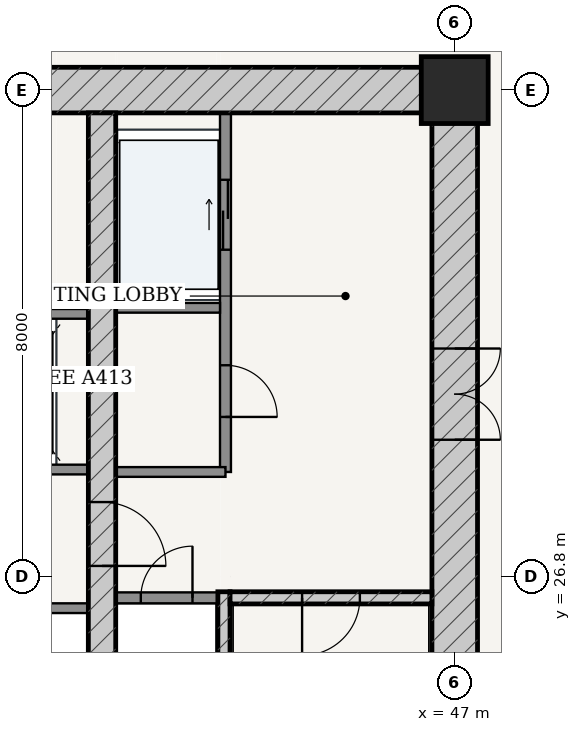
"""IFC4 building model, lengths in metres.
Left out: names, types, materials, properties, quantities, classifications, styles, units other than length and angle.
Written with IfcOpenShell. Run it as: python <this file> out.ifc"""

import sys

from ifc_helpers import new_model, si_unit, direction, frame, frame_2d, origin, origin_2d, place, context, subcontext, project, spatial, rectangle, extrude, source, transform, mapped, element, fill, save


model = new_model("IFC4")
c1 = context("Model", 3, precision=1e-05, world=origin(), true_north=direction((-0.2419218956, 0.970295726276)))
c2 = subcontext(c1, "Body", "Model", "MODEL_VIEW")
j1 = project(units=[si_unit("LENGTHUNIT", "METRE"), si_unit("PLANEANGLEUNIT", "RADIAN")], contexts=[c1])
p1 = place(None, origin())
s1 = spatial("IfcSite", under=j1, at=p1, CompositionType="ELEMENT")
p2 = place(p1, origin())
s2 = spatial("IfcBuilding", under=s1, at=p2, CompositionType="ELEMENT")
p3 = place(p2, frame((0.0, 0.0, 70.8)))
s3 = spatial("IfcBuildingStorey", under=s2, at=p3, CompositionType="ELEMENT", Elevation=70.8)
p4 = place(p3, frame((47.0, 34.8, 0.0), z_axis=(0.0, 0.0, 1.0), x_axis=(1.0, 0.0, 0.0)))
e1 = element("IfcColumn", 1, at=p4, inside=s3, PredefinedType="COLUMN", context=c2, shape_type="SweptSolid", body=[
    extrude(rectangle(XDim=1.1, YDim=1.1, at=origin_2d()), origin(), (0.0, 0.0, 1.0), 3.6),
])
p5 = place(p3, frame((28.625, 34.8, 0.0), z_axis=(0.0, 0.0, 1.0), x_axis=(1.0, 0.0, 0.0)))
e2 = element("IfcWall", 2, at=p5, inside=s3, PredefinedType="SHEAR", context=c2, shape_type="SweptSolid", body=[
    extrude(rectangle(XDim=18.75, YDim=0.75, at=frame_2d((9.375, 0.0))), origin(), (0.0, 0.0, 1.0), 3.15),
])
p6 = place(p5, frame((7.407, 0.0, 0.0)))
e3 = element("IfcOpeningElement", 3, at=p6, cuts=e2, PredefinedType="OPENING", context=c2, shape_type="SweptSolid", body=[
    extrude(rectangle(XDim=0.86, YDim=2.1, at=frame_2d((0.43, 1.05))), frame((0.0, 0.385, 0.0), z_axis=(0.0, -1.0, 0.0), x_axis=(1.0, 0.0, 0.0)), (0.0, 0.0, 1.0), 0.77),
])
p7 = place(p5, frame((10.488, 0.0, 0.0)))
e4 = element("IfcOpeningElement", 4, at=p7, cuts=e2, PredefinedType="OPENING", context=c2, shape_type="SweptSolid", body=[
    extrude(rectangle(XDim=0.85, YDim=2.1, at=frame_2d((0.425, 1.05))), frame((0.0, 0.385, 0.0), z_axis=(0.0, -1.0, 0.0), x_axis=(1.0, 0.0, 0.0)), (0.0, 0.0, 1.0), 0.77),
])
p8 = place(p3, frame((47.0, 19.175, 0.0), z_axis=(0.0, 0.0, 1.0), x_axis=(0.0, 1.0, 0.0)))
e5 = element("IfcWall", 5, at=p8, inside=s3, PredefinedType="SHEAR", context=c2, shape_type="SweptSolid", body=[
    extrude(rectangle(XDim=15.25, YDim=0.75, at=frame_2d((7.625, 0.0))), origin(), (0.0, 0.0, 1.0), 3.15),
])
p9 = place(p8, frame((9.875, 0.0, 0.0)))
e6 = element("IfcOpeningElement", 6, at=p9, cuts=e5, PredefinedType="OPENING", context=c2, shape_type="SweptSolid", body=[
    extrude(rectangle(XDim=1.5, YDim=2.2, at=frame_2d((0.75, 1.1))), frame((0.0, 0.385, 0.0), z_axis=(0.0, -1.0, 0.0), x_axis=(1.0, 0.0, 0.0)), (0.0, 0.0, 1.0), 0.77),
])
p10 = place(p3, frame((43.205, 19.175, 0.0), z_axis=(0.0, 0.0, 1.0), x_axis=(0.0, 1.0, 0.0)))
e7 = element("IfcWall", 7, at=p10, inside=s3, PredefinedType="SOLIDWALL", context=c2, shape_type="SweptSolid", body=[
    extrude(rectangle(XDim=7.375, YDim=0.2, at=frame_2d((3.688, 0.0))), origin(), (0.0, 0.0, 1.0), 3.15),
])
p11 = place(p3, frame((43.305, 26.45, 0.0), z_axis=(0.0, 0.0, 1.0), x_axis=(1.0, 0.0, 0.0)))
e8 = element("IfcWall", 8, at=p11, inside=s3, PredefinedType="SOLIDWALL", context=c2, shape_type="SweptSolid", body=[
    extrude(rectangle(XDim=3.32, YDim=0.2, at=frame_2d((1.66, 0.0))), origin(), (0.0, 0.0, 1.0), 3.15),
])
p12 = place(p11, frame((1.185, 0.0, 0.0)))
e9 = element("IfcOpeningElement", 9, at=p12, cuts=e8, PredefinedType="OPENING", context=c2, shape_type="SweptSolid", body=[
    extrude(rectangle(XDim=0.95, YDim=2.15, at=frame_2d((0.475, 1.075))), frame((0.0, 0.11, 0.0), z_axis=(0.0, -1.0, 0.0), x_axis=(1.0, 0.0, 0.0)), (0.0, 0.0, 1.0), 0.22),
])
p13 = place(p3, frame((41.2, 19.175, 0.0), z_axis=(0.0, 0.0, 1.0), x_axis=(0.0, 1.0, 0.0)))
e10 = element("IfcWall", 10, at=p13, inside=s3, PredefinedType="SHEAR", context=c2, shape_type="SweptSolid", body=[
    extrude(rectangle(XDim=15.25, YDim=0.45, at=frame_2d((7.625, 0.0))), origin(), (0.0, 0.0, 1.0), 3.15),
])
p14 = place(p13, frame((7.8, 0.0, 0.0)))
e11 = element("IfcOpeningElement", 11, at=p14, cuts=e10, PredefinedType="OPENING", context=c2, shape_type="SweptSolid", body=[
    extrude(rectangle(XDim=1.05, YDim=2.15, at=frame_2d((0.525, 1.075))), frame((0.0, 0.235, 0.0), z_axis=(0.0, -1.0, 0.0), x_axis=(1.0, 0.0, 0.0)), (0.0, 0.0, 1.0), 0.47),
])
p15 = place(p3, frame((41.425, 26.45, 0.0), z_axis=(0.0, 0.0, 1.0), x_axis=(1.0, 0.0, 0.0)))
e12 = element("IfcWall", 12, at=p15, inside=s3, PredefinedType="PARTITIONING", context=c2, shape_type="SweptSolid", body=[
    extrude(rectangle(XDim=1.675, YDim=0.18, at=frame_2d((0.837, 0.0))), origin(), (0.0, 0.0, 1.0), 3.15),
])
p16 = place(p15, frame((0.413, 0.0, 0.0)))
e13 = element("IfcOpeningElement", 13, at=p16, cuts=e12, PredefinedType="OPENING", context=c2, shape_type="SweptSolid", body=[
    extrude(rectangle(XDim=0.85, YDim=2.1, at=frame_2d((0.425, 1.05))), frame((0.0, 0.1, 0.0), z_axis=(0.0, -1.0, 0.0), x_axis=(1.0, 0.0, 0.0)), (0.0, 0.0, 1.0), 0.2),
])
p17 = place(p3, frame((43.23, 28.52, 0.0), z_axis=(0.0, 0.0, 1.0), x_axis=(0.0, 1.0, 0.0)))
e14 = element("IfcWall", 14, at=p17, inside=s3, PredefinedType="PARTITIONING", context=c2, shape_type="SweptSolid", body=[
    extrude(rectangle(XDim=5.905, YDim=0.18, at=frame_2d((2.953, 0.0))), origin(), (0.0, 0.0, 1.0), 3.15),
])
p18 = place(p17, frame((0.905, 0.0, 0.0)))
e15 = element("IfcOpeningElement", 15, at=p18, cuts=e14, PredefinedType="OPENING", context=c2, shape_type="SweptSolid", body=[
    extrude(rectangle(XDim=0.85, YDim=2.1, at=frame_2d((0.425, 1.05))), frame((0.0, 0.1, 0.0), z_axis=(0.0, -1.0, 0.0), x_axis=(1.0, 0.0, 0.0)), (0.0, 0.0, 1.0), 0.2),
])
p19 = place(p17, frame((3.655, 0.0, 0.0)))
e16 = element("IfcOpeningElement", 16, at=p19, cuts=e14, PredefinedType="OPENING", context=c2, shape_type="SweptSolid", body=[
    extrude(rectangle(XDim=1.15, YDim=2.2, at=frame_2d((0.575, 1.1))), frame((0.0, 0.1, 0.0), z_axis=(0.0, -1.0, 0.0), x_axis=(1.0, 0.0, 0.0)), (0.0, 0.0, 1.0), 0.2),
])
p20 = place(p3, frame((41.425, 31.22, 0.0), z_axis=(0.0, 0.0, 1.0), x_axis=(1.0, 0.0, 0.0)))
e17 = element("IfcWall", 17, at=p20, inside=s3, PredefinedType="PARTITIONING", context=c2, shape_type="SweptSolid", body=[
    extrude(rectangle(XDim=1.715, YDim=0.16, at=frame_2d((0.857, 0.0))), origin(), (0.0, 0.0, 1.0), 3.15),
])
p21 = place(p3, frame((41.425, 28.52, 0.0), z_axis=(0.0, 0.0, 1.0), x_axis=(1.0, 0.0, 0.0)))
e18 = element("IfcWall", 18, at=p21, inside=s3, PredefinedType="PARTITIONING", context=c2, shape_type="SweptSolid", body=[
    extrude(rectangle(XDim=1.805, YDim=0.16, at=frame_2d((0.902, 0.0))), origin(), (0.0, 0.0, 1.0), 3.15),
])
p22 = place(p3, frame((35.025, 28.56, 0.0), z_axis=(0.0, 0.0, 1.0), x_axis=(1.0, 0.0, 0.0)))
e19 = element("IfcWall", 19, at=p22, inside=s3, PredefinedType="PARTITIONING", context=c2, shape_type="SweptSolid", body=[
    extrude(rectangle(XDim=5.95, YDim=0.16, at=frame_2d((2.975, 0.0))), origin(), (0.0, 0.0, 1.0), 3.15),
])
p23 = place(p22, frame((0.76, 0.0, 0.0)))
e20 = element("IfcOpeningElement", 20, at=p23, cuts=e19, PredefinedType="OPENING", context=c2, shape_type="SweptSolid", body=[
    extrude(rectangle(XDim=1.1, YDim=2.2, at=frame_2d((0.55, 1.1))), frame((0.0, 0.09, 0.0), z_axis=(0.0, -1.0, 0.0), x_axis=(1.0, 0.0, 0.0)), (0.0, 0.0, 1.0), 0.18),
])
p24 = place(p22, frame((2.425, 0.0, 0.0)))
e21 = element("IfcOpeningElement", 21, at=p24, cuts=e19, PredefinedType="OPENING", context=c2, shape_type="SweptSolid", body=[
    extrude(rectangle(XDim=1.1, YDim=2.2, at=frame_2d((0.55, 1.1))), frame((0.0, 0.09, 0.0), z_axis=(0.0, -1.0, 0.0), x_axis=(1.0, 0.0, 0.0)), (0.0, 0.0, 1.0), 0.18),
])
p25 = place(p22, frame((4.09, 0.0, 0.0)))
e22 = element("IfcOpeningElement", 22, at=p25, cuts=e19, PredefinedType="OPENING", context=c2, shape_type="SweptSolid", body=[
    extrude(rectangle(XDim=1.1, YDim=2.2, at=frame_2d((0.55, 1.1))), frame((0.0, 0.09, 0.0), z_axis=(0.0, -1.0, 0.0), x_axis=(1.0, 0.0, 0.0)), (0.0, 0.0, 1.0), 0.18),
])
for number, where, z_axis, x_axis in (
    (23, (35.025, 31.12, 0.0), (0.0, 0.0, 1.0), (1.0, 0.0, 0.0)),
    (24, (35.025, 26.28, 0.0), (0.0, 0.0, 1.0), (1.0, 0.0, 0.0)),
):
    element("IfcWall", number, at=place(p3, frame(where, z_axis=z_axis, x_axis=x_axis)), inside=s3, PredefinedType="PARTITIONING", context=c2, shape_type="SweptSolid", body=[
        extrude(rectangle(XDim=5.95, YDim=0.16, at=frame_2d((2.975, 0.0))), origin(), (0.0, 0.0, 1.0), 3.15),
    ])
m1 = source(origin(), c2, "Body", "SweptSolid", [
    extrude(rectangle(XDim=1.5, YDim=2.2, at=frame_2d((0.75, 1.1))), frame((0.0, 0.025, 0.0), z_axis=(0.0, -1.0, 0.0), x_axis=(1.0, 0.0, 0.0)), (0.0, 0.0, 1.0), 0.05),
])
p26 = place(p9, frame((1.5, 0.0, 0.0), z_axis=(0.0, 0.0, 1.0), x_axis=(-1.0, 0.0, 0.0)))
e25 = element("IfcDoor", 25, at=p26, inside=s3, OperationType="DOUBLE_DOOR_SINGLE_SWING", PredefinedType="DOOR", context=c2, shape_type="MappedRepresentation", body=[
    mapped(m1, transform((0.0, 0.0, 0.0), scale=1.0)),
])
fill(e6, e25)
m2 = source(origin(), c2, "Body", "SweptSolid", [
    extrude(rectangle(XDim=1.05, YDim=2.15, at=frame_2d((0.525, 1.075))), frame((0.0, 0.025, 0.0), z_axis=(0.0, -1.0, 0.0), x_axis=(1.0, 0.0, 0.0)), (0.0, 0.0, 1.0), 0.05),
])
p27 = place(p14, frame((1.05, 0.0, 0.0), z_axis=(0.0, 0.0, 1.0), x_axis=(-1.0, 0.0, 0.0)))
e26 = element("IfcDoor", 26, at=p27, inside=s3, OperationType="SINGLE_SWING_RIGHT", PredefinedType="DOOR", context=c2, shape_type="MappedRepresentation", body=[
    mapped(m2, transform((0.0, 0.0, 0.0), scale=1.0)),
])
fill(e11, e26)
m3 = source(origin(), c2, "Body", "SweptSolid", [
    extrude(rectangle(XDim=0.95, YDim=2.15, at=frame_2d((0.475, 1.075))), frame((0.0, 0.025, 0.0), z_axis=(0.0, -1.0, 0.0), x_axis=(1.0, 0.0, 0.0)), (0.0, 0.0, 1.0), 0.05),
])
p28 = place(p12, frame((0.95, 0.0, 0.0), z_axis=(0.0, 0.0, 1.0), x_axis=(-1.0, 0.0, 0.0)))
e27 = element("IfcDoor", 27, at=p28, inside=s3, OperationType="SINGLE_SWING_RIGHT", PredefinedType="DOOR", context=c2, shape_type="MappedRepresentation", body=[
    mapped(m3, transform((0.0, 0.0, 0.0), scale=1.0)),
])
fill(e9, e27)
m4 = source(origin(), c2, "Body", "SweptSolid", [
    extrude(rectangle(XDim=0.85, YDim=2.1, at=frame_2d((0.425, 1.05))), frame((0.0, 0.025, 0.0), z_axis=(0.0, -1.0, 0.0), x_axis=(1.0, 0.0, 0.0)), (0.0, 0.0, 1.0), 0.05),
])
p29 = place(p16, origin())
e28 = element("IfcDoor", 28, at=p29, inside=s3, OperationType="SINGLE_SWING_RIGHT", PredefinedType="DOOR", context=c2, shape_type="MappedRepresentation", body=[
    mapped(m4, transform((0.0, 0.0, 0.0), scale=1.0)),
])
fill(e13, e28)
p30 = place(p18, frame((0.85, 0.0, 0.0), z_axis=(0.0, 0.0, 1.0), x_axis=(-1.0, 0.0, 0.0)))
e29 = element("IfcDoor", 29, at=p30, inside=s3, OperationType="SINGLE_SWING_RIGHT", PredefinedType="DOOR", context=c2, shape_type="MappedRepresentation", body=[
    mapped(m4, transform((0.0, 0.0, 0.0), scale=1.0)),
])
fill(e15, e29)
m5 = source(origin(), c2, "Body", "SweptSolid", [
    extrude(rectangle(XDim=1.15, YDim=2.2, at=frame_2d((0.575, 1.1))), frame((0.0, 0.025, 0.0), z_axis=(0.0, -1.0, 0.0), x_axis=(1.0, 0.0, 0.0)), (0.0, 0.0, 1.0), 0.05),
])
p31 = place(p19, origin())
e30 = element("IfcDoor", 30, at=p31, inside=s3, OperationType="DOUBLE_DOOR_SLIDING", PredefinedType="DOOR", context=c2, shape_type="MappedRepresentation", body=[
    mapped(m5, transform((0.0, 0.0, 0.0), scale=1.0)),
])
fill(e16, e30)
save(model, sys.argv[1])
